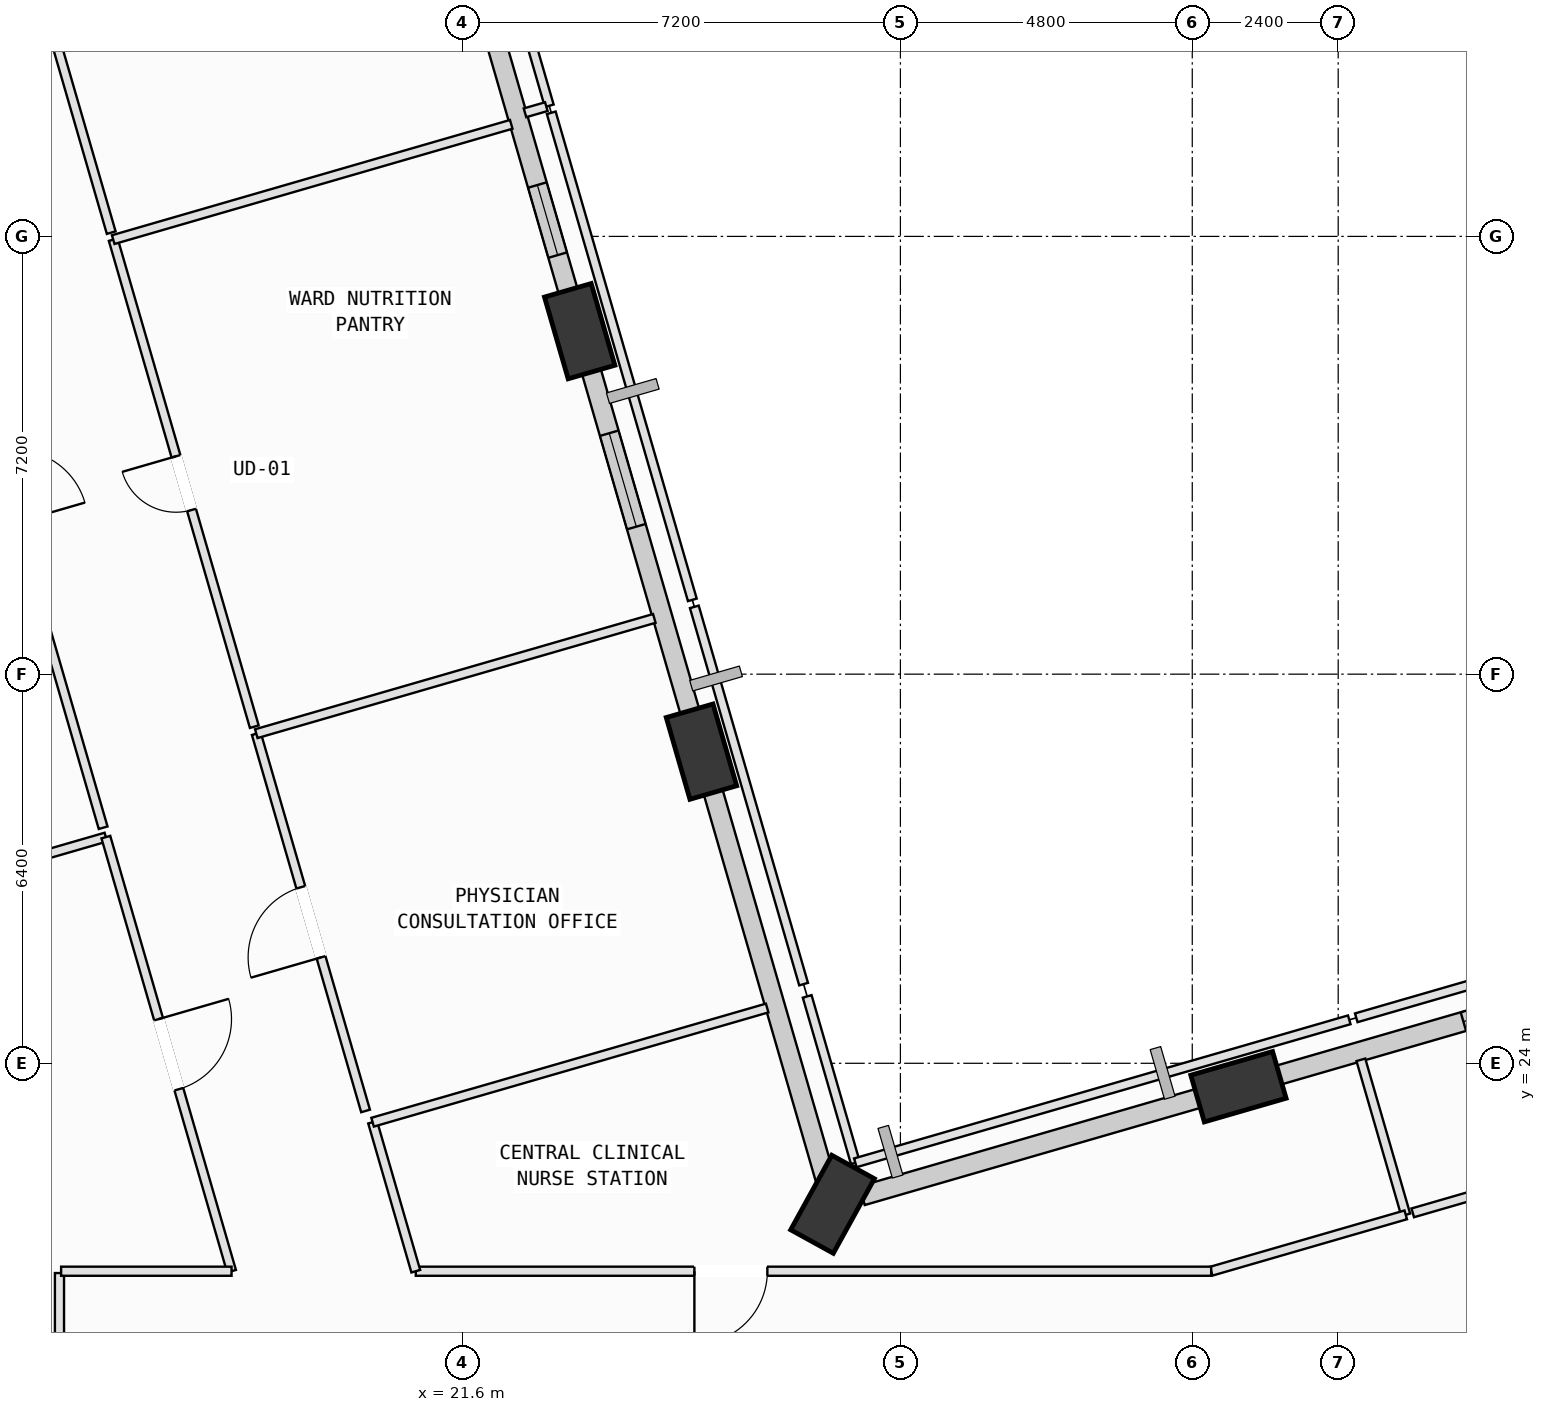
"""IFC4 building model, lengths in metres.
Left out: names, types, materials, properties, quantities, classifications, styles, units other than length and angle.
Written with IfcOpenShell. Run it as: python <this file> out.ifc"""

import sys

from ifc_helpers import new_model, si_unit, direction, frame, frame_2d, origin, origin_2d, place, context, subcontext, project, spatial, rectangle, extrude, element, fill, save


model = new_model("IFC4")
c1 = context("Model", 3, precision=1e-05, world=origin(), true_north=direction((0.0, 1.0)))
c2 = subcontext(c1, "Body", "Model", "MODEL_VIEW")
j1 = project(units=[si_unit("LENGTHUNIT", "METRE"), si_unit("PLANEANGLEUNIT", "RADIAN")], contexts=[c1])
p1 = place(None, origin())
s1 = spatial("IfcSite", under=j1, at=p1, CompositionType="ELEMENT")
p2 = place(p1, origin())
s2 = spatial("IfcBuilding", under=s1, at=p2, CompositionType="ELEMENT")
p3 = place(p2, frame((0.0, 0.0, 92.4)))
s3 = spatial("IfcBuildingStorey", under=s2, at=p3, CompositionType="ELEMENT", Elevation=92.4)
p4 = place(p3, frame((34.36, 23.615, 0.002), z_axis=(0.004887203919, 0.003176682547, 0.999983011819), x_axis=(-0.756692991713, 0.653768374575, 0.001621325912)))
e1 = element("IfcColumn", 1, at=p4, inside=s3, PredefinedType="COLUMN", context=c2, shape_type="SweptSolid", body=[
    extrude(rectangle(XDim=1.4, YDim=0.8, at=origin_2d()), origin(), (0.0, 0.0, 1.0), 3.996),
])
p5 = place(p3, frame((27.684, 21.681, 0.002), z_axis=(0.01312953202, -0.024427036317, 0.999615393682), x_axis=(0.010491137864, 0.999649902666, 0.024290082866)))
e2 = element("IfcColumn", 2, at=p5, inside=s3, PredefinedType="COLUMN", context=c2, shape_type="SweptSolid", body=[
    extrude(rectangle(XDim=1.4, YDim=0.8, at=origin_2d()), origin(), (0.0, 0.0, 1.0), 3.998),
])
p6 = place(p3, frame((25.528, 29.125, 0.002), z_axis=(-0.017642620003, -0.033575920422, 0.99928043888), x_axis=(0.20024153282, 0.979068959558, 0.036432141899)))
e3 = element("IfcColumn", 3, at=p6, inside=s3, PredefinedType="COLUMN", context=c2, shape_type="SweptSolid", body=[
    extrude(rectangle(XDim=1.4, YDim=0.8, at=origin_2d()), origin(), (0.0, 0.0, 1.0), 3.999),
])
p7 = place(p3, frame((23.526, 36.041, 0.002), z_axis=(-0.046216520229, -0.042070447174, 0.998045144636), x_axis=(0.521685945625, 0.851022960879, 0.060030777066)))
e4 = element("IfcColumn", 4, at=p7, inside=s3, PredefinedType="COLUMN", context=c2, shape_type="SweptSolid", body=[
    extrude(rectangle(XDim=1.4, YDim=0.8, at=origin_2d()), origin(), (0.0, 0.0, 1.0), 4.004),
])
p8 = place(p3, frame((34.847, 23.756, 0.0), z_axis=(0.0, 0.0, 1.0), x_axis=(0.96052833926, 0.278182151618, 0.0)))
e5 = element("IfcWall", 5, at=p8, inside=s3, PredefinedType="SOLIDWALL", context=c2, shape_type="SweptSolid", body=[
    extrude(rectangle(XDim=6.211, YDim=0.32, at=frame_2d((3.105, 0.0))), origin(), (0.0, 0.0, 1.0), 3.165),
])
p9 = place(p8, frame((3.344, 0.0, 0.75)))
e6 = element("IfcOpeningElement", 6, at=p9, cuts=e5, PredefinedType="OPENING", context=c2, shape_type="SweptSolid", body=[
    extrude(rectangle(XDim=1.4, YDim=1.85, at=frame_2d((0.7, 0.925))), frame((0.0, 0.17, 0.0), z_axis=(0.0, -1.0, 0.0), x_axis=(1.0, 0.0, 0.0)), (0.0, 0.0, 1.0), 0.34),
])
p10 = place(p3, frame((28.169, 21.822, 0.0), z_axis=(0.0, 0.0, 1.0), x_axis=(0.96054093962, 0.278138640455, 0.0)))
e7 = element("IfcWall", 7, at=p10, inside=s3, PredefinedType="SOLIDWALL", context=c2, shape_type="SweptSolid", body=[
    extrude(rectangle(XDim=5.96, YDim=0.32, at=frame_2d((2.98, 0.0))), origin(), (0.0, 0.0, 1.0), 3.165),
])
p11 = place(p3, frame((25.681, 28.599, 0.0), z_axis=(0.0, 0.0, 1.0), x_axis=(0.278120336546, -0.960546239595, 0.0)))
e8 = element("IfcWall", 8, at=p11, inside=s3, PredefinedType="SOLIDWALL", context=c2, shape_type="SweptSolid", body=[
    extrude(rectangle(XDim=6.76, YDim=0.32, at=frame_2d((3.38, 0.0))), origin(), (0.0, 0.0, 1.0), 2.965),
])
p12 = place(p3, frame((23.675, 35.524, 0.0), z_axis=(0.0, 0.0, 1.0), x_axis=(0.278160004848, -0.960534752991, 0.0)))
e9 = element("IfcWall", 9, at=p12, inside=s3, PredefinedType="SOLIDWALL", context=c2, shape_type="SweptSolid", body=[
    extrude(rectangle(XDim=6.223, YDim=0.32, at=frame_2d((3.111, 0.0))), origin(), (0.0, 0.0, 1.0), 3.165),
])
p13 = place(p12, frame((1.209, 0.0, 0.75)))
e10 = element("IfcOpeningElement", 10, at=p13, cuts=e9, PredefinedType="OPENING", context=c2, shape_type="SweptSolid", body=[
    extrude(rectangle(XDim=1.6, YDim=1.95, at=frame_2d((0.8, 0.975))), frame((0.0, 0.17, 0.0), z_axis=(0.0, -1.0, 0.0), x_axis=(1.0, 0.0, 0.0)), (0.0, 0.0, 1.0), 0.34),
])
p14 = place(p3, frame((22.003, 41.301, 0.0), z_axis=(0.0, 0.0, 1.0), x_axis=(0.278130894343, -0.960543182586, 0.0)))
e11 = element("IfcWall", 11, at=p14, inside=s3, PredefinedType="SOLIDWALL", context=c2, shape_type="SweptSolid", body=[
    extrude(rectangle(XDim=5.047, YDim=0.32, at=frame_2d((2.524, 0.0))), origin(), (0.0, 0.0, 1.0), 3.165),
])
p15 = place(p14, frame((2.973, 0.0, 0.75)))
e12 = element("IfcOpeningElement", 12, at=p15, cuts=e11, PredefinedType="OPENING", context=c2, shape_type="SweptSolid", body=[
    extrude(rectangle(XDim=1.2, YDim=1.75, at=frame_2d((0.6, 0.875))), frame((0.0, 0.17, 0.0), z_axis=(0.0, -1.0, 0.0), x_axis=(1.0, 0.0, 0.0)), (0.0, 0.0, 1.0), 0.34),
])
p16 = place(p3, frame((38.03, 18.847, 0.0), z_axis=(0.0, 0.0, 1.0), x_axis=(0.960527884636, 0.278183721372, 0.0)))
e13 = element("IfcWall", 13, at=p16, inside=s3, PredefinedType="PARTITIONING", context=c2, shape_type="SweptSolid", body=[
    extrude(rectangle(XDim=6.841, YDim=0.15, at=frame_2d((3.42, 0.0))), origin(), (0.0, 0.0, 1.0), 2.965),
])
p17 = place(p16, frame((2.821, 0.0, 0.0)))
e14 = element("IfcOpeningElement", 14, at=p17, cuts=e13, PredefinedType="OPENING", context=c2, shape_type="SweptSolid", body=[
    extrude(rectangle(XDim=1.2, YDim=2.15, at=frame_2d((0.6, 1.075))), frame((0.0, 0.085, 0.0), z_axis=(0.0, -1.0, 0.0), x_axis=(1.0, 0.0, 0.0)), (0.0, 0.0, 1.0), 0.17),
])
p18 = place(p3, frame((14.97, 20.55, 0.0), z_axis=(0.0, 0.0, 1.0), x_axis=(0.0, -1.0, 0.0)))
e15 = element("IfcWall", 15, at=p18, inside=s3, PredefinedType="PARTITIONING", context=c2, shape_type="SweptSolid", body=[
    extrude(rectangle(XDim=2.32, YDim=0.15, at=frame_2d((1.16, 0.0))), origin(), (0.0, 0.0, 1.0), 2.965),
])
p19 = place(p3, frame((5.2, 24.67, 0.0), z_axis=(0.0, 0.0, 1.0), x_axis=(0.960539065788, 0.27814511158, 0.0)))
e16 = element("IfcWall", 16, at=p19, inside=s3, PredefinedType="PARTITIONING", context=c2, shape_type="SweptSolid", body=[
    extrude(rectangle(XDim=10.966, YDim=0.15, at=frame_2d((5.483, 0.0))), origin(), (0.0, 0.0, 1.0), 3.78),
])
p20 = place(p3, frame((15.733, 27.72, 0.0), z_axis=(0.0, 0.0, 1.0), x_axis=(0.278098749545, -0.960552489717, 0.0)))
e17 = element("IfcWall", 17, at=p20, inside=s3, PredefinedType="PARTITIONING", context=c2, shape_type="SweptSolid", body=[
    extrude(rectangle(XDim=7.433, YDim=0.15, at=frame_2d((3.717, 0.0))), origin(), (0.0, 0.0, 1.0), 3.78),
])
p21 = place(p20, frame((3.117, 0.0, 0.0)))
e18 = element("IfcOpeningElement", 18, at=p21, cuts=e17, PredefinedType="OPENING", context=c2, shape_type="SweptSolid", body=[
    extrude(rectangle(XDim=1.2, YDim=2.15, at=frame_2d((0.6, 1.075))), frame((0.0, 0.085, 0.0), z_axis=(0.0, -1.0, 0.0), x_axis=(1.0, 0.0, 0.0)), (0.0, 0.0, 1.0), 0.17),
])
p22 = place(p3, frame((17.8, 20.58, 0.0), z_axis=(0.0, 0.0, 1.0), x_axis=(-1.0, 0.0, 0.0)))
e19 = element("IfcWall", 19, at=p22, inside=s3, PredefinedType="PARTITIONING", context=c2, shape_type="SweptSolid", body=[
    extrude(rectangle(XDim=2.803, YDim=0.15, at=frame_2d((1.401, 0.0))), origin(), (0.0, 0.0, 1.0), 3.78),
])
p23 = place(p3, frame((12.45, 39.055, 0.0), z_axis=(0.0, 0.0, 1.0), x_axis=(0.278173677599, -0.960530793411, 0.0)))
e20 = element("IfcWall", 20, at=p23, inside=s3, PredefinedType="PARTITIONING", context=c2, shape_type="SweptSolid", body=[
    extrude(rectangle(XDim=11.64, YDim=0.15, at=frame_2d((5.82, 0.0))), origin(), (0.0, 0.0, 1.0), 3.78),
])
p24 = place(p23, frame((5.22, 0.0, 0.0)))
e21 = element("IfcOpeningElement", 21, at=p24, cuts=e20, PredefinedType="OPENING", context=c2, shape_type="SweptSolid", body=[
    extrude(rectangle(XDim=1.2, YDim=2.15, at=frame_2d((0.6, 1.075))), frame((0.0, 0.085, 0.0), z_axis=(0.0, -1.0, 0.0), x_axis=(1.0, 0.0, 0.0)), (0.0, 0.0, 1.0), 0.17),
])
p25 = place(p3, frame((36.373, 24.057, 0.0), z_axis=(0.0, 0.0, 1.0), x_axis=(0.278035744254, -0.960570728743, 0.0)))
e22 = element("IfcWall", 22, at=p25, inside=s3, PredefinedType="PARTITIONING", context=c2, shape_type="SweptSolid", body=[
    extrude(rectangle(XDim=2.655, YDim=0.15, at=frame_2d((1.327, 0.0))), origin(), (0.0, 0.0, 1.0), 3.78),
])
p26 = place(p3, frame((37.111, 21.507, 0.0), z_axis=(0.0, 0.0, 1.0), x_axis=(-0.96051377414, -0.278232438237, 0.0)))
e23 = element("IfcWall", 23, at=p26, inside=s3, PredefinedType="PARTITIONING", context=c2, shape_type="SweptSolid", body=[
    extrude(rectangle(XDim=3.332, YDim=0.15, at=frame_2d((1.666, 0.0))), origin(), (0.0, 0.0, 1.0), 3.78),
])
p27 = place(p3, frame((33.911, 20.58, 0.0), z_axis=(0.0, 0.0, 1.0), x_axis=(-1.0, 0.0, 0.0)))
e24 = element("IfcWall", 24, at=p27, inside=s3, PredefinedType="PARTITIONING", context=c2, shape_type="SweptSolid", body=[
    extrude(rectangle(XDim=13.081, YDim=0.15, at=frame_2d((6.541, 0.0))), origin(), (0.0, 0.0, 1.0), 3.78),
])
p28 = place(p27, frame((7.299, 0.0, 0.0)))
e25 = element("IfcOpeningElement", 25, at=p28, cuts=e24, PredefinedType="OPENING", context=c2, shape_type="SweptSolid", body=[
    extrude(rectangle(XDim=1.2, YDim=2.15, at=frame_2d((0.6, 1.075))), frame((0.0, 0.085, 0.0), z_axis=(0.0, -1.0, 0.0), x_axis=(1.0, 0.0, 0.0)), (0.0, 0.0, 1.0), 0.17),
])
p29 = place(p3, frame((20.83, 20.58, 0.0), z_axis=(0.0, 0.0, 1.0), x_axis=(-0.278232310288, 0.960513811203, 0.0)))
e26 = element("IfcWall", 26, at=p29, inside=s3, PredefinedType="PARTITIONING", context=c2, shape_type="SweptSolid", body=[
    extrude(rectangle(XDim=2.552, YDim=0.15, at=frame_2d((1.276, 0.0))), origin(), (0.0, 0.0, 1.0), 3.78),
])
p30 = place(p3, frame((20.12, 23.031, 0.0), z_axis=(0.0, 0.0, 1.0), x_axis=(0.9605800129, 0.278003666913, 0.0)))
e27 = element("IfcWall", 27, at=p30, inside=s3, PredefinedType="PARTITIONING", context=c2, shape_type="SweptSolid", body=[
    extrude(rectangle(XDim=6.755, YDim=0.15, at=frame_2d((3.377, 0.0))), origin(), (0.0, 0.0, 1.0), 3.78),
])
p31 = place(p3, frame((27.267, 25.1, 0.0), z_axis=(0.0, 0.0, 1.0), x_axis=(0.277956131192, -0.960593769048, 0.0)))
e28 = element("IfcWall", 28, at=p31, inside=s3, PredefinedType="PARTITIONING", context=c2, shape_type="SweptSolid", body=[
    extrude(rectangle(XDim=2.849, YDim=0.15, at=frame_2d((1.425, 0.0))), origin(), (0.0, 0.0, 1.0), 3.78),
])
p32 = place(p3, frame((28.059, 22.363, 0.0), z_axis=(0.0, 0.0, 1.0), x_axis=(0.960541736942, 0.27813588692, 0.0)))
e29 = element("IfcWall", 29, at=p32, inside=s3, PredefinedType="PARTITIONING", context=c2, shape_type="SweptSolid", body=[
    extrude(rectangle(XDim=8.457, YDim=0.15, at=frame_2d((4.228, 0.0))), origin(), (0.0, 0.0, 1.0), 3.78),
])
p33 = place(p3, frame((48.998, 24.949, 0.0), z_axis=(0.0, 0.0, 1.0), x_axis=(-0.960536816253, -0.278152879948, 0.0)))
e30 = element("IfcWall", 30, at=p33, inside=s3, PredefinedType="PARTITIONING", context=c2, shape_type="SweptSolid", body=[
    extrude(rectangle(XDim=12.256, YDim=0.15, at=frame_2d((6.128, 0.0))), origin(), (0.0, 0.0, 1.0), 2.965),
])
p34 = place(p33, frame((5.528, 0.0, 0.0)))
e31 = element("IfcOpeningElement", 31, at=p34, cuts=e30, PredefinedType="OPENING", context=c2, shape_type="SweptSolid", body=[
    extrude(rectangle(XDim=1.2, YDim=2.15, at=frame_2d((0.6, 1.075))), frame((0.0, 0.085, 0.0), z_axis=(0.0, -1.0, 0.0), x_axis=(1.0, 0.0, 0.0)), (0.0, 0.0, 1.0), 0.17),
])
p35 = place(p3, frame((36.297, 24.748, 0.0), z_axis=(0.0, 0.0, 1.0), x_axis=(0.960536816253, 0.278152879948, 0.0)))
e32 = element("IfcWall", 32, at=p35, inside=s3, PredefinedType="PARTITIONING", context=c2, shape_type="SweptSolid", body=[
    extrude(rectangle(XDim=12.256, YDim=0.15, at=frame_2d((6.128, 0.0))), origin(), (0.0, 0.0, 1.0), 3.165),
])
p36 = place(p3, frame((20.004, 23.216, 0.0), z_axis=(0.0, 0.0, 1.0), x_axis=(-0.278163608181, 0.960533709499, 0.0)))
e33 = element("IfcWall", 33, at=p36, inside=s3, PredefinedType="PARTITIONING", context=c2, shape_type="SweptSolid", body=[
    extrude(rectangle(XDim=6.46, YDim=0.15, at=frame_2d((3.23, 0.0))), origin(), (0.0, 0.0, 1.0), 3.78),
])
p37 = place(p36, frame((2.63, 0.0, 0.0)))
e34 = element("IfcOpeningElement", 34, at=p37, cuts=e33, PredefinedType="OPENING", context=c2, shape_type="SweptSolid", body=[
    extrude(rectangle(XDim=1.2, YDim=2.15, at=frame_2d((0.6, 1.075))), frame((0.0, 0.085, 0.0), z_axis=(0.0, -1.0, 0.0), x_axis=(1.0, 0.0, 0.0)), (0.0, 0.0, 1.0), 0.17),
])
p38 = place(p3, frame((18.207, 29.421, 0.0), z_axis=(0.0, 0.0, 1.0), x_axis=(0.960519935436, 0.278211167335, 0.0)))
e35 = element("IfcWall", 35, at=p38, inside=s3, PredefinedType="PARTITIONING", context=c2, shape_type="SweptSolid", body=[
    extrude(rectangle(XDim=6.815, YDim=0.15, at=frame_2d((3.407, 0.0))), origin(), (0.0, 0.0, 1.0), 3.78),
])
p39 = place(p3, frame((25.411, 31.507, 0.0), z_axis=(0.0, 0.0, 1.0), x_axis=(0.278188378588, -0.960526535822, 0.0)))
e36 = element("IfcWall", 36, at=p39, inside=s3, PredefinedType="PARTITIONING", context=c2, shape_type="SweptSolid", body=[
    extrude(rectangle(XDim=6.46, YDim=0.15, at=frame_2d((3.23, 0.0))), origin(), (0.0, 0.0, 1.0), 3.78),
])
p40 = place(p3, frame((18.174, 29.536, 0.0), z_axis=(0.0, 0.0, 1.0), x_axis=(-0.278171795837, 0.960531338375, 0.0)))
e37 = element("IfcWall", 37, at=p40, inside=s3, PredefinedType="PARTITIONING", context=c2, shape_type="SweptSolid", body=[
    extrude(rectangle(XDim=8.34, YDim=0.15, at=frame_2d((4.17, 0.0))), origin(), (0.0, 0.0, 1.0), 3.78),
])
p41 = place(p40, frame((3.71, 0.0, 0.0)))
e38 = element("IfcOpeningElement", 38, at=p41, cuts=e37, PredefinedType="OPENING", context=c2, shape_type="SweptSolid", body=[
    extrude(rectangle(XDim=0.92, YDim=2.1, at=frame_2d((0.46, 1.05))), frame((0.0, 0.085, 0.0), z_axis=(0.0, -1.0, 0.0), x_axis=(1.0, 0.0, 0.0)), (0.0, 0.0, 1.0), 0.17),
])
p42 = place(p3, frame((15.854, 37.547, 0.0), z_axis=(0.0, 0.0, 1.0), x_axis=(0.960519935436, 0.278211167335, 0.0)))
e39 = element("IfcWall", 39, at=p42, inside=s3, PredefinedType="PARTITIONING", context=c2, shape_type="SweptSolid", body=[
    extrude(rectangle(XDim=6.815, YDim=0.15, at=frame_2d((3.407, 0.0))), origin(), (0.0, 0.0, 1.0), 3.78),
])
p43 = place(p3, frame((23.058, 39.633, 0.0), z_axis=(0.0, 0.0, 1.0), x_axis=(0.278152609406, -0.960536894596, 0.0)))
e40 = element("IfcWall", 40, at=p43, inside=s3, PredefinedType="PARTITIONING", context=c2, shape_type="SweptSolid", body=[
    extrude(rectangle(XDim=8.34, YDim=0.15, at=frame_2d((4.17, 0.0))), origin(), (0.0, 0.0, 1.0), 3.78),
])
p44 = place(p3, frame((21.022, 46.664, 0.0), z_axis=(0.0, 0.0, 1.0), x_axis=(0.278176631297, -0.960529938003, 0.0)))
e41 = element("IfcWall", 41, at=p44, inside=s3, PredefinedType="PARTITIONING", context=c2, shape_type="SweptSolid", body=[
    extrude(rectangle(XDim=7.2, YDim=0.15, at=frame_2d((3.6, 0.0))), origin(), (0.0, 0.0, 1.0), 3.78),
])
p45 = place(p3, frame((22.977, 39.734, 0.0), z_axis=(0.0, 0.0, 1.0), x_axis=(-0.961144701931, -0.27604503609, 0.0)))
e42 = element("IfcWall", 42, at=p45, inside=s3, PredefinedType="PARTITIONING", context=c2, shape_type="SweptSolid", body=[
    extrude(rectangle(XDim=0.365, YDim=0.15, at=frame_2d((0.183, 0.0))), origin(), (0.0, 0.0, 1.0), 3.78),
])
p46 = place(p3, frame((15.821, 37.662, 0.0), z_axis=(0.0, 0.0, 1.0), x_axis=(-0.278211165239, 0.960519936043, 0.0)))
e43 = element("IfcWall", 43, at=p46, inside=s3, PredefinedType="PARTITIONING", context=c2, shape_type="SweptSolid", body=[
    extrude(rectangle(XDim=8.015, YDim=0.15, at=frame_2d((4.008, 0.0))), origin(), (0.0, 0.0, 1.0), 3.78),
])
p47 = place(p46, frame((3.548, 0.0, 0.0)))
e44 = element("IfcOpeningElement", 44, at=p47, cuts=e43, PredefinedType="OPENING", context=c2, shape_type="SweptSolid", body=[
    extrude(rectangle(XDim=0.92, YDim=2.1, at=frame_2d((0.46, 1.05))), frame((0.0, 0.085, 0.0), z_axis=(0.0, -1.0, 0.0), x_axis=(1.0, 0.0, 0.0)), (0.0, 0.0, 1.0), 0.17),
])
p48 = place(p9, origin())
e45 = element("IfcWindow", 45, at=p48, inside=s3, PartitioningType="SINGLE_PANEL", PredefinedType="WINDOW", context=c2, shape_type="SweptSolid", body=[
    extrude(rectangle(XDim=1.4, YDim=1.85, at=frame_2d((0.7, 0.925))), frame((0.0, 0.03, 0.0), z_axis=(0.0, -1.0, 0.0), x_axis=(1.0, 0.0, 0.0)), (0.0, 0.0, 1.0), 0.06),
])
fill(e6, e45)
p49 = place(p13, origin())
e46 = element("IfcWindow", 46, at=p49, inside=s3, PartitioningType="SINGLE_PANEL", PredefinedType="WINDOW", context=c2, shape_type="SweptSolid", body=[
    extrude(rectangle(XDim=1.6, YDim=1.95, at=frame_2d((0.8, 0.975))), frame((0.0, 0.03, 0.0), z_axis=(0.0, -1.0, 0.0), x_axis=(1.0, 0.0, 0.0)), (0.0, 0.0, 1.0), 0.06),
])
fill(e10, e46)
p50 = place(p15, origin())
e47 = element("IfcWindow", 47, at=p50, inside=s3, PartitioningType="SINGLE_PANEL", PredefinedType="WINDOW", context=c2, shape_type="SweptSolid", body=[
    extrude(rectangle(XDim=1.2, YDim=1.75, at=frame_2d((0.6, 0.875))), frame((0.0, 0.03, 0.0), z_axis=(0.0, -1.0, 0.0), x_axis=(1.0, 0.0, 0.0)), (0.0, 0.0, 1.0), 0.06),
])
fill(e12, e47)
p51 = place(p21, origin())
e48 = element("IfcDoor", 48, at=p51, inside=s3, OperationType="SINGLE_SWING_LEFT", PredefinedType="DOOR", context=c2, shape_type="SweptSolid", body=[
    extrude(rectangle(XDim=1.2, YDim=2.15, at=frame_2d((0.6, 1.075))), frame((0.0, 0.025, 0.0), z_axis=(0.0, -1.0, 0.0), x_axis=(1.0, 0.0, 0.0)), (0.0, 0.0, 1.0), 0.05),
])
fill(e18, e48)
p52 = place(p28, origin())
e49 = element("IfcDoor", 49, at=p52, inside=s3, OperationType="SINGLE_SWING_RIGHT", PredefinedType="DOOR", context=c2, shape_type="SweptSolid", body=[
    extrude(rectangle(XDim=1.2, YDim=2.15, at=frame_2d((0.6, 1.075))), frame((0.0, 0.025, 0.0), z_axis=(0.0, -1.0, 0.0), x_axis=(1.0, 0.0, 0.0)), (0.0, 0.0, 1.0), 0.05),
])
fill(e25, e49)
p53 = place(p37, origin())
e50 = element("IfcDoor", 50, at=p53, inside=s3, OperationType="SINGLE_SWING_LEFT", PredefinedType="DOOR", context=c2, shape_type="SweptSolid", body=[
    extrude(rectangle(XDim=1.2, YDim=2.15, at=frame_2d((0.6, 1.075))), frame((0.0, 0.025, 0.0), z_axis=(0.0, -1.0, 0.0), x_axis=(1.0, 0.0, 0.0)), (0.0, 0.0, 1.0), 0.05),
])
fill(e34, e50)
p54 = place(p41, origin())
e51 = element("IfcDoor", 51, at=p54, inside=s3, OperationType="SINGLE_SWING_RIGHT", PredefinedType="DOOR", context=c2, shape_type="SweptSolid", body=[
    extrude(rectangle(XDim=0.92, YDim=2.1, at=frame_2d((0.46, 1.05))), frame((0.0, 0.025, 0.0), z_axis=(0.0, -1.0, 0.0), x_axis=(1.0, 0.0, 0.0)), (0.0, 0.0, 1.0), 0.05),
])
fill(e38, e51)
save(model, sys.argv[1])
